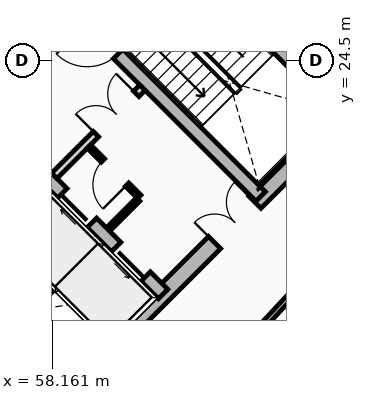
"""IFC4 building model, lengths in metres.
Left out: names, types, materials, properties, quantities, classifications, styles, units other than length and angle.
Written with IfcOpenShell. Run it as: python <this file> out.ifc"""

import sys

from ifc_helpers import new_model, si_unit, direction, frame, frame_2d, origin, place, context, subcontext, project, spatial, rectangle, extrude, source, transform, mapped, element, fill, save


model = new_model("IFC4")
c1 = context("Model", 3, precision=1e-05, world=origin(), true_north=direction((0.0, 1.0)))
c2 = subcontext(c1, "Body", "Model", "MODEL_VIEW")
j1 = project(units=[si_unit("LENGTHUNIT", "METRE"), si_unit("PLANEANGLEUNIT", "RADIAN")], contexts=[c1])
p1 = place(None, origin())
s1 = spatial("IfcSite", under=j1, at=p1, CompositionType="ELEMENT")
p2 = place(p1, origin())
s2 = spatial("IfcBuilding", under=s1, at=p2, CompositionType="ELEMENT")
p3 = place(p2, frame((0.0, 0.0, 129.16)))
s3 = spatial("IfcBuildingStorey", under=s2, at=p3, CompositionType="ELEMENT", Elevation=129.16)
for number, where, z_axis, x_axis in (
    (1, (58.737, 15.697, 0.0), (0.0, 0.0, 1.0), (-0.707, 0.707, 0.0)),
    (2, (66.303, 23.263, 0.0), (0.0, 0.0, 1.0), (-0.707, 0.707, 0.0)),
):
    element("IfcWall", number, at=place(p3, frame(where, z_axis=z_axis, x_axis=x_axis)), inside=s3, PredefinedType="SHEAR", context=c2, shape_type="SweptSolid", body=[
        extrude(rectangle(XDim=14.2, YDim=0.45, at=frame_2d((7.1, 0.0))), origin(), (0.0, 0.0, 1.0), 3.72),
    ])
p4 = place(p3, frame((58.578, 15.856, 0.0), z_axis=(0.0, 0.0, 1.0), x_axis=(0.707106781187, 0.707106781187, 0.0)))
e3 = element("IfcWall", 3, at=p4, inside=s3, PredefinedType="SHEAR", context=c2, shape_type="SweptSolid", body=[
    extrude(rectangle(XDim=10.7, YDim=0.45, at=frame_2d((5.35, 0.0))), origin(), (0.0, 0.0, 1.0), 3.72),
])
m1 = source(origin(), c2, "Body", "SweptSolid", [
    extrude(rectangle(XDim=1.5, YDim=2.02, at=frame_2d((0.75, 1.01))), frame((0.0, 0.235, 0.0), z_axis=(0.0, -1.0, 0.0), x_axis=(1.0, 0.0, 0.0)), (0.0, 0.0, 1.0), 0.47),
])
p5 = place(p4, frame((5.45, 0.0, 0.0)))
e4 = element("IfcOpeningElement", 4, at=p5, cuts=e3, PredefinedType="OPENING", context=c2, shape_type="MappedRepresentation", body=[
    mapped(m1, transform((0.0, 0.0, 0.0), x_axis=(1.0, 0.0, 0.0), y_axis=(0.0, 1.0, 0.0), z_axis=(0.0, 0.0, 1.0), scale=1.0)),
])
p6 = place(p3, frame((61.078, 18.355, 0.0), z_axis=(0.0, 0.0, 1.0), x_axis=(-0.707106781187, 0.707106781187, 0.0)))
e5 = element("IfcWall", 5, at=p6, inside=s3, PredefinedType="SHEAR", context=c2, shape_type="SweptSolid", body=[
    extrude(rectangle(XDim=13.75, YDim=0.35, at=frame_2d((6.875, 0.0))), origin(), (0.0, 0.0, 1.0), 3.72),
])
m2 = source(origin(), c2, "Body", "SweptSolid", [
    extrude(rectangle(XDim=1.1, YDim=2.015, at=frame_2d((0.55, 1.007))), frame((0.0, 0.185, 0.0), z_axis=(0.0, -1.0, 0.0), x_axis=(1.0, 0.0, 0.0)), (0.0, 0.0, 1.0), 0.37),
])
p7 = place(p6, frame((4.875, 0.0, 0.0)))
e6 = element("IfcOpeningElement", 6, at=p7, cuts=e5, PredefinedType="OPENING", context=c2, shape_type="MappedRepresentation", body=[
    mapped(m2, transform((0.0, 0.0, 0.0), x_axis=(1.0, 0.0, 0.0), y_axis=(0.0, 1.0, 0.0), z_axis=(0.0, 0.0, 1.0), scale=1.0)),
])
p8 = place(p6, frame((0.65, 0.0, 0.0)))
e7 = element("IfcOpeningElement", 7, at=p8, cuts=e5, PredefinedType="OPENING", context=c2, shape_type="MappedRepresentation", body=[
    mapped(m2, transform((0.0, 0.0, 0.0), x_axis=(1.0, 0.0, 0.0), y_axis=(0.0, 1.0, 0.0), z_axis=(0.0, 0.0, 1.0), scale=1.0)),
])
p9 = place(p6, frame((2.65, 0.0, 0.0)))
e8 = element("IfcOpeningElement", 8, at=p9, cuts=e5, PredefinedType="OPENING", context=c2, shape_type="MappedRepresentation", body=[
    mapped(m2, transform((0.0, 0.0, 0.0), x_axis=(1.0, 0.0, 0.0), y_axis=(0.0, 1.0, 0.0), z_axis=(0.0, 0.0, 1.0), scale=1.0)),
])
m3 = source(origin(), c2, "Body", "SweptSolid", [
    extrude(rectangle(XDim=1.15, YDim=2.02, at=frame_2d((0.575, 1.01))), frame((0.0, 0.185, 0.0), z_axis=(0.0, -1.0, 0.0), x_axis=(1.0, 0.0, 0.0)), (0.0, 0.0, 1.0), 0.37),
])
p10 = place(p6, frame((7.295, 0.0, 0.0)))
e9 = element("IfcOpeningElement", 9, at=p10, cuts=e5, PredefinedType="OPENING", context=c2, shape_type="MappedRepresentation", body=[
    mapped(m3, transform((0.0, 0.0, 0.0), x_axis=(1.0, 0.0, 0.0), y_axis=(0.0, 1.0, 0.0), z_axis=(0.0, 0.0, 1.0), scale=1.0)),
])
p11 = place(p3, frame((63.645, 20.922, 0.0), z_axis=(0.0, 0.0, 1.0), x_axis=(-0.707106781187, 0.707106781187, 0.0)))
e10 = element("IfcWall", 10, at=p11, inside=s3, PredefinedType="SHEAR", context=c2, shape_type="SweptSolid", body=[
    extrude(rectangle(XDim=13.75, YDim=0.35, at=frame_2d((6.875, 0.0))), origin(), (0.0, 0.0, 1.0), 3.72),
])
p12 = place(p11, frame((10.0, 0.0, 0.0)))
e11 = element("IfcOpeningElement", 11, at=p12, cuts=e10, PredefinedType="OPENING", context=c2, shape_type="MappedRepresentation", body=[
    mapped(m2, transform((0.0, 0.0, 0.0), x_axis=(1.0, 0.0, 0.0), y_axis=(0.0, 1.0, 0.0), z_axis=(0.0, 0.0, 1.0), scale=1.0)),
])
p13 = place(p11, frame((12.0, 0.0, 0.0)))
e12 = element("IfcOpeningElement", 12, at=p13, cuts=e10, PredefinedType="OPENING", context=c2, shape_type="MappedRepresentation", body=[
    mapped(m2, transform((0.0, 0.0, 0.0), x_axis=(1.0, 0.0, 0.0), y_axis=(0.0, 1.0, 0.0), z_axis=(0.0, 0.0, 1.0), scale=1.0)),
])
p14 = place(p11, frame((5.305, 0.0, 0.0)))
e13 = element("IfcOpeningElement", 13, at=p14, cuts=e10, PredefinedType="OPENING", context=c2, shape_type="MappedRepresentation", body=[
    mapped(m3, transform((0.0, 0.0, 0.0), x_axis=(1.0, 0.0, 0.0), y_axis=(0.0, 1.0, 0.0), z_axis=(0.0, 0.0, 1.0), scale=1.0)),
])
p15 = place(p3, frame((65.83, 23.107, 0.0), z_axis=(0.0, 0.0, 1.0), x_axis=(-0.707088616009, 0.707124945897, 0.0)))
e14 = element("IfcWall", 14, at=p15, inside=s3, PredefinedType="SHEAR", context=c2, shape_type="SweptSolid", body=[
    extrude(rectangle(XDim=6.72, YDim=0.35, at=frame_2d((3.36, 0.0))), origin(), (0.0, 0.0, 1.0), 3.72),
])
p16 = place(p3, frame((57.284, 17.673, 0.0), z_axis=(0.0, 0.0, 1.0), x_axis=(0.707147878904, 0.70706568108, 0.0)))
e15 = element("IfcWall", 15, at=p16, inside=s3, PredefinedType="SHEAR", context=c2, shape_type="SweptSolid", body=[
    extrude(rectangle(XDim=2.97, YDim=0.2, at=frame_2d((1.485, 0.0))), origin(), (0.0, 0.0, 1.0), 3.72),
])
p17 = place(p3, frame((58.737, 16.644, 0.0), z_axis=(0.0, 0.0, 1.0), x_axis=(-0.707032117043, 0.707181437447, 0.0)))
e16 = element("IfcWall", 16, at=p17, inside=s3, PredefinedType="SHEAR", context=c2, shape_type="SweptSolid", body=[
    extrude(rectangle(XDim=1.635, YDim=0.2, at=frame_2d((0.817, 0.0))), origin(), (0.0, 0.0, 1.0), 3.72),
])
p18 = place(p3, frame((58.214, 21.467, 0.0), z_axis=(0.0, 0.0, 1.0), x_axis=(0.707106781187, 0.707106781187, 0.0)))
e17 = element("IfcWall", 17, at=p18, inside=s3, PredefinedType="PARTITIONING", context=c2, shape_type="SweptSolid", body=[
    extrude(rectangle(XDim=3.28, YDim=0.2, at=frame_2d((1.64, 0.0))), origin(), (0.0, 0.0, 1.0), 3.425),
])
m4 = source(origin(), c2, "Body", "SweptSolid", [
    extrude(rectangle(XDim=1.5, YDim=2.02, at=frame_2d((0.75, 1.01))), frame((0.0, 0.11, 0.0), z_axis=(0.0, -1.0, 0.0), x_axis=(1.0, 0.0, 0.0)), (0.0, 0.0, 1.0), 0.22),
])
p19 = place(p18, frame((1.55, 0.0, 0.0)))
e18 = element("IfcOpeningElement", 18, at=p19, cuts=e17, PredefinedType="OPENING", context=c2, shape_type="MappedRepresentation", body=[
    mapped(m4, transform((0.0, 0.0, 0.0), x_axis=(1.0, 0.0, 0.0), y_axis=(0.0, 1.0, 0.0), z_axis=(0.0, 0.0, 1.0), scale=1.0)),
])
p20 = place(p3, frame((60.448, 20.915, 0.0), z_axis=(0.0, 0.0, 1.0), x_axis=(-0.707106781187, 0.707106781187, 0.0)))
e19 = element("IfcWall", 19, at=p20, inside=s3, PredefinedType="PARTITIONING", context=c2, shape_type="SweptSolid", body=[
    extrude(rectangle(XDim=1.87, YDim=0.125, at=frame_2d((0.935, 0.0))), origin(), (0.0, 0.0, 1.0), 3.425),
])
m5 = source(origin(), c2, "Body", "SweptSolid", [
    extrude(rectangle(XDim=0.9, YDim=2.005, at=frame_2d((0.45, 1.002))), frame((0.0, 0.073, 0.0), z_axis=(0.0, -1.0, 0.0), x_axis=(1.0, 0.0, 0.0)), (0.0, 0.0, 1.0), 0.145),
])
p21 = place(p20, frame((0.45, 0.0, 0.0)))
e20 = element("IfcOpeningElement", 20, at=p21, cuts=e19, PredefinedType="OPENING", context=c2, shape_type="MappedRepresentation", body=[
    mapped(m5, transform((0.0, 0.0, 0.0), x_axis=(1.0, 0.0, 0.0), y_axis=(0.0, 1.0, 0.0), z_axis=(0.0, 0.0, 1.0), scale=1.0)),
])
p22 = place(p3, frame((59.643, 20.066, 0.0), z_axis=(0.0, 0.0, 1.0), x_axis=(0.707106781187, 0.707106781187, 0.0)))
e21 = element("IfcWall", 21, at=p22, inside=s3, PredefinedType="PARTITIONING", context=c2, shape_type="SweptSolid", body=[
    extrude(rectangle(XDim=1.1, YDim=0.125, at=frame_2d((0.55, 0.0))), origin(), (0.0, 0.0, 1.0), 3.425),
])
p23 = place(p3, frame((62.903, 16.667, 0.0), z_axis=(0.0, 0.0, 1.0), x_axis=(0.682371947497, 0.731005147225, 0.0)))
e22 = element("IfcWall", 22, at=p23, inside=s3, PredefinedType="PARTITIONING", context=c2, shape_type="SweptSolid", body=[
    extrude(rectangle(XDim=6.642, YDim=0.15, at=frame_2d((3.321, 0.0))), origin(), (0.0, 0.0, 1.0), 2.995),
])
m6 = source(origin(), c2, "Body", "SweptSolid", [
    extrude(rectangle(XDim=1.1, YDim=2.015, at=frame_2d((0.55, 1.007))), frame((0.0, 0.025, 0.0), z_axis=(0.0, -1.0, 0.0), x_axis=(1.0, 0.0, 0.0)), (0.0, 0.0, 1.0), 0.05),
])
p24 = place(p8, origin())
e23 = element("IfcDoor", 23, at=p24, inside=s3, OperationType="SLIDING_TO_LEFT", PredefinedType="DOOR", context=c2, shape_type="MappedRepresentation", body=[
    mapped(m6, transform((0.0, 0.0, 0.0), x_axis=(1.0, 0.0, 0.0), y_axis=(0.0, 1.0, 0.0), z_axis=(0.0, 0.0, 1.0), scale=1.0)),
])
fill(e7, e23)
p25 = place(p9, origin())
e24 = element("IfcDoor", 24, at=p25, inside=s3, OperationType="SLIDING_TO_RIGHT", PredefinedType="DOOR", context=c2, shape_type="MappedRepresentation", body=[
    mapped(m6, transform((0.0, 0.0, 0.0), x_axis=(1.0, 0.0, 0.0), y_axis=(0.0, 1.0, 0.0), z_axis=(0.0, 0.0, 1.0), scale=1.0)),
])
fill(e8, e24)
m7 = source(origin(), c2, "Body", "SweptSolid", [
    extrude(rectangle(XDim=1.15, YDim=2.02, at=frame_2d((0.575, 1.01))), frame((0.0, 0.025, 0.0), z_axis=(0.0, -1.0, 0.0), x_axis=(1.0, 0.0, 0.0)), (0.0, 0.0, 1.0), 0.05),
])
p26 = place(p14, origin())
e25 = element("IfcDoor", 25, at=p26, inside=s3, OperationType="SINGLE_SWING_RIGHT", PredefinedType="DOOR", context=c2, shape_type="MappedRepresentation", body=[
    mapped(m7, transform((0.0, 0.0, 0.0), x_axis=(1.0, 0.0, 0.0), y_axis=(0.0, 1.0, 0.0), z_axis=(0.0, 0.0, 1.0), scale=1.0)),
])
fill(e13, e25)
m8 = source(origin(), c2, "Body", "SweptSolid", [
    extrude(rectangle(XDim=1.5, YDim=2.02, at=frame_2d((0.75, 1.01))), frame((0.0, 0.025, 0.0), z_axis=(0.0, -1.0, 0.0), x_axis=(1.0, 0.0, 0.0)), (0.0, 0.0, 1.0), 0.05),
])
p27 = place(p5, origin())
e26 = element("IfcDoor", 26, at=p27, inside=s3, OperationType="DOUBLE_DOOR_SINGLE_SWING", PredefinedType="DOOR", context=c2, shape_type="MappedRepresentation", body=[
    mapped(m8, transform((0.0, 0.0, 0.0), x_axis=(1.0, 0.0, 0.0), y_axis=(0.0, 1.0, 0.0), z_axis=(0.0, 0.0, 1.0), scale=1.0)),
])
fill(e4, e26)
p28 = place(p19, origin())
e27 = element("IfcDoor", 27, at=p28, inside=s3, OperationType="DOUBLE_DOOR_SINGLE_SWING", PredefinedType="DOOR", context=c2, shape_type="MappedRepresentation", body=[
    mapped(m8, transform((0.0, 0.0, 0.0), x_axis=(1.0, 0.0, 0.0), y_axis=(0.0, 1.0, 0.0), z_axis=(0.0, 0.0, 1.0), scale=1.0)),
])
fill(e18, e27)
m9 = source(origin(), c2, "Body", "SweptSolid", [
    extrude(rectangle(XDim=0.9, YDim=2.005, at=frame_2d((0.45, 1.002))), frame((0.0, 0.025, 0.0), z_axis=(0.0, -1.0, 0.0), x_axis=(1.0, 0.0, 0.0)), (0.0, 0.0, 1.0), 0.05),
])
p29 = place(p21, origin())
e28 = element("IfcDoor", 28, at=p29, inside=s3, OperationType="SINGLE_SWING_LEFT", PredefinedType="DOOR", context=c2, shape_type="MappedRepresentation", body=[
    mapped(m9, transform((0.0, 0.0, 0.0), x_axis=(1.0, 0.0, 0.0), y_axis=(0.0, 1.0, 0.0), z_axis=(0.0, 0.0, 1.0), scale=1.0)),
])
fill(e20, e28)
save(model, sys.argv[1])
